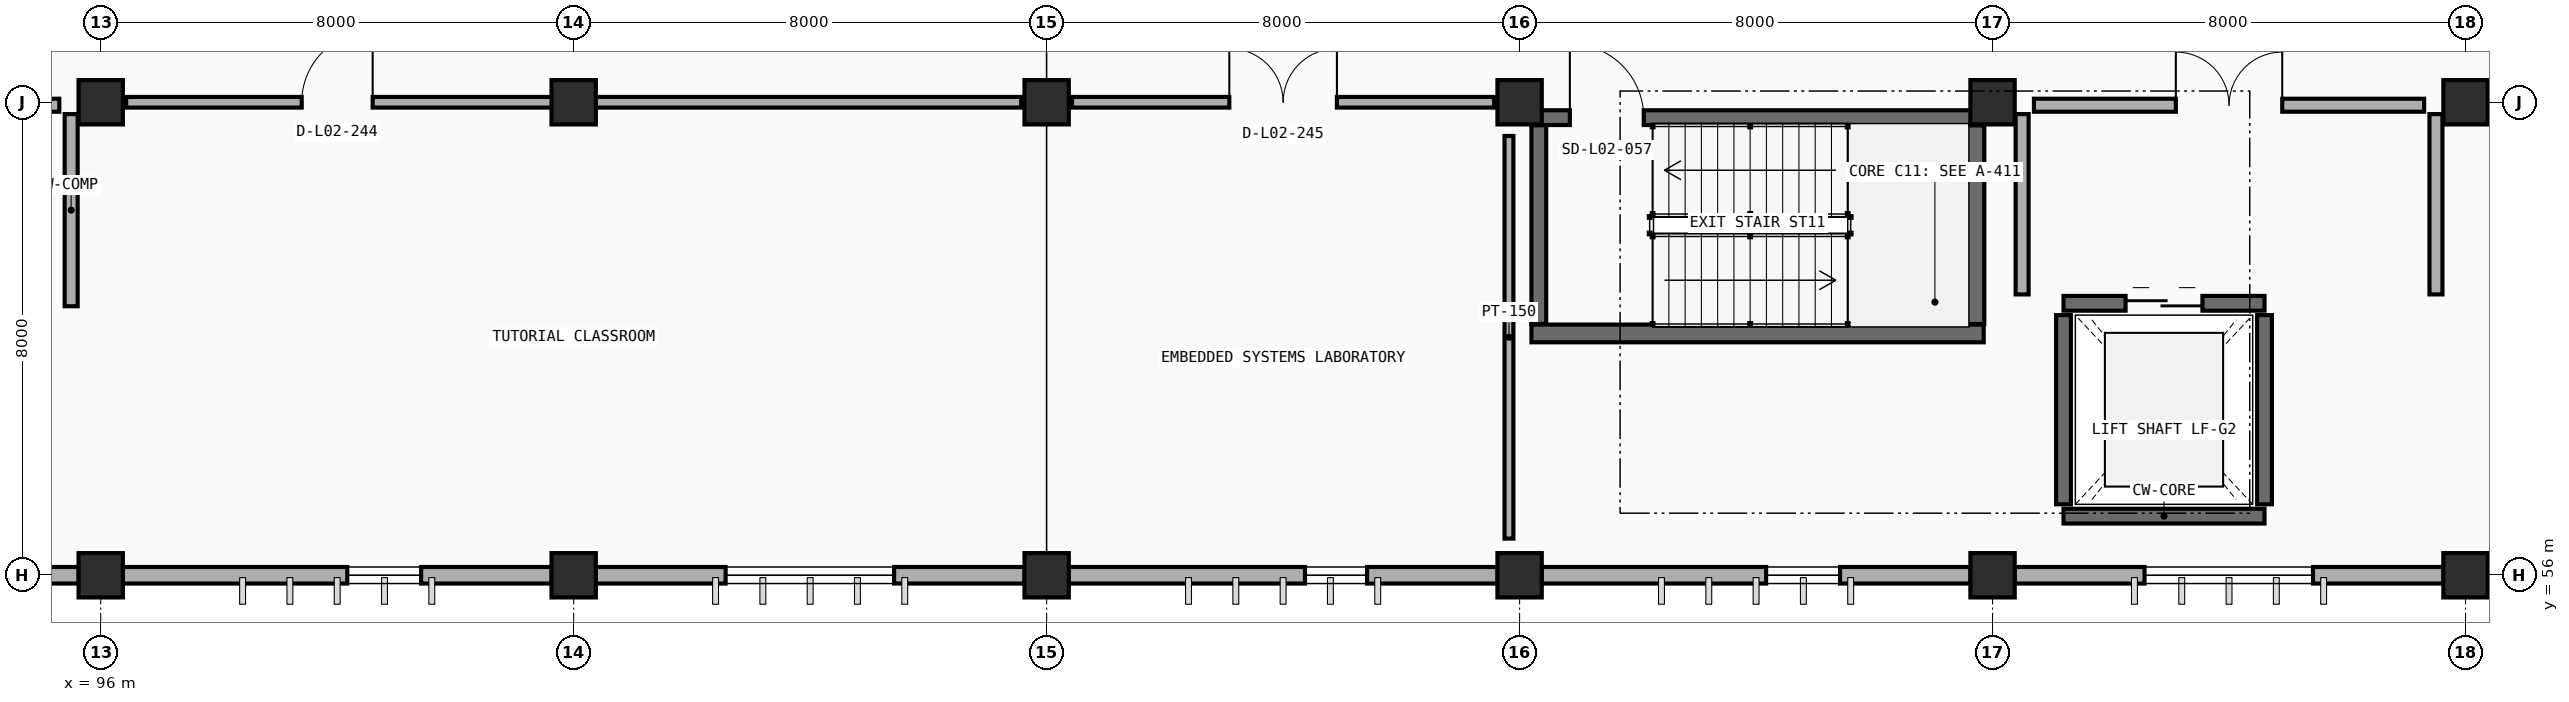
"""IFC4 building model, lengths in metres.
Left out: names, types, materials, properties, quantities, classifications, styles, units other than length and angle.
Written with IfcOpenShell. Run it as: python <this file> out.ifc"""

import sys

from ifc_helpers import new_model, si_unit, direction, frame, frame_2d, origin, origin_2d, place, context, subcontext, project, spatial, rectangle, extrude, element, fill, save


model = new_model("IFC4")
c1 = context("Model", 3, precision=1e-05, world=origin(), true_north=direction((0.0, 1.0)))
c2 = subcontext(c1, "Body", "Model", "MODEL_VIEW")
j1 = project(units=[si_unit("LENGTHUNIT", "METRE"), si_unit("PLANEANGLEUNIT", "RADIAN")], contexts=[c1])
p1 = place(None, origin())
s1 = spatial("IfcSite", under=j1, at=p1, CompositionType="ELEMENT")
p2 = place(p1, origin())
s2 = spatial("IfcBuilding", under=s1, at=p2, CompositionType="ELEMENT")
p3 = place(p2, frame((0.0, 0.0, 4.8)))
s3 = spatial("IfcBuildingStorey", under=s2, at=p3, CompositionType="ELEMENT", Elevation=4.8)
for number, where, z_axis, x_axis in (
    (1, (96.0, 56.0, 0.0), (0.0, 0.0, 1.0), (1.0, 0.0, 0.0)),
    (2, (104.0, 56.0, 0.0), (0.0, 0.0, 1.0), (1.0, 0.0, 0.0)),
    (3, (112.0, 56.0, 0.0), (0.0, 0.0, 1.0), (1.0, 0.0, 0.0)),
    (4, (120.0, 56.0, 0.0), (0.0, 0.0, 1.0), (1.0, 0.0, 0.0)),
    (5, (128.0, 56.0, 0.0), (0.0, 0.0, 1.0), (1.0, 0.0, 0.0)),
    (6, (136.0, 56.0, 0.0), (0.0, 0.0, 1.0), (1.0, 0.0, 0.0)),
    (7, (96.0, 64.0, 0.0), (0.0, 0.0, 1.0), (1.0, 0.0, 0.0)),
    (8, (104.0, 64.0, 0.0), (0.0, 0.0, 1.0), (1.0, 0.0, 0.0)),
    (9, (112.0, 64.0, 0.0), (0.0, 0.0, 1.0), (1.0, 0.0, 0.0)),
    (10, (120.0, 64.0, 0.0), (0.0, 0.0, 1.0), (1.0, 0.0, 0.0)),
    (11, (128.0, 64.0, 0.0), (0.0, 0.0, 1.0), (1.0, 0.0, 0.0)),
    (12, (136.0, 64.0, 0.0), (0.0, 0.0, 1.0), (1.0, 0.0, 0.0)),
):
    element("IfcColumn", number, at=place(p3, frame(where, z_axis=z_axis, x_axis=x_axis)), inside=s3, PredefinedType="COLUMN", context=c2, shape_type="SweptSolid", body=[
        extrude(rectangle(XDim=0.75, YDim=0.75, at=origin_2d()), origin(), (0.0, 0.0, 1.0), 4.8),
    ])
p4 = place(p3, frame((95.628, 56.0, 0.0), z_axis=(0.0, 0.0, 1.0), x_axis=(-1.0, 0.0, 0.0)))
e13 = element("IfcWall", 13, at=p4, inside=s3, PredefinedType="STANDARD", context=c2, shape_type="SweptSolid", body=[
    extrude(rectangle(XDim=7.256, YDim=0.28, at=frame_2d((3.628, 0.0))), origin(), (0.0, 0.0, 1.0), 3.91),
])
p5 = place(p4, frame((2.208, 0.0, 0.9)))
e14 = element("IfcOpeningElement", 14, at=p5, cuts=e13, PredefinedType="OPENING", context=c2, shape_type="SweptSolid", body=[
    extrude(rectangle(XDim=1.05, YDim=2.0, at=frame_2d((0.525, 1.0))), frame((0.0, 0.15, 0.0), z_axis=(0.0, -1.0, 0.0), x_axis=(1.0, 0.0, 0.0)), (0.0, 0.0, 1.0), 0.3),
])
p6 = place(p3, frame((103.628, 56.0, 0.0), z_axis=(0.0, 0.0, 1.0), x_axis=(-1.0, 0.0, 0.0)))
e15 = element("IfcWall", 15, at=p6, inside=s3, PredefinedType="STANDARD", context=c2, shape_type="SweptSolid", body=[
    extrude(rectangle(XDim=7.256, YDim=0.28, at=frame_2d((3.628, 0.0))), origin(), (0.0, 0.0, 1.0), 3.91),
])
p7 = place(p6, frame((2.208, 0.0, 0.9)))
e16 = element("IfcOpeningElement", 16, at=p7, cuts=e15, PredefinedType="OPENING", context=c2, shape_type="SweptSolid", body=[
    extrude(rectangle(XDim=1.25, YDim=2.0, at=frame_2d((0.625, 1.0))), frame((0.0, 0.15, 0.0), z_axis=(0.0, -1.0, 0.0), x_axis=(1.0, 0.0, 0.0)), (0.0, 0.0, 1.0), 0.3),
])
p8 = place(p3, frame((111.628, 56.0, 0.0), z_axis=(0.0, 0.0, 1.0), x_axis=(-1.0, 0.0, 0.0)))
e17 = element("IfcWall", 17, at=p8, inside=s3, PredefinedType="STANDARD", context=c2, shape_type="SweptSolid", body=[
    extrude(rectangle(XDim=7.256, YDim=0.28, at=frame_2d((3.628, 0.0))), origin(), (0.0, 0.0, 1.0), 3.91),
])
p9 = place(p8, frame((2.208, 0.0, 0.9)))
e18 = element("IfcOpeningElement", 18, at=p9, cuts=e17, PredefinedType="OPENING", context=c2, shape_type="SweptSolid", body=[
    extrude(rectangle(XDim=2.85, YDim=1.85, at=frame_2d((1.425, 0.925))), frame((0.0, 0.15, 0.0), z_axis=(0.0, -1.0, 0.0), x_axis=(1.0, 0.0, 0.0)), (0.0, 0.0, 1.0), 0.3),
])
p10 = place(p3, frame((119.628, 56.0, 0.0), z_axis=(0.0, 0.0, 1.0), x_axis=(-1.0, 0.0, 0.0)))
e19 = element("IfcWall", 19, at=p10, inside=s3, PredefinedType="STANDARD", context=c2, shape_type="SweptSolid", body=[
    extrude(rectangle(XDim=7.256, YDim=0.28, at=frame_2d((3.628, 0.0))), origin(), (0.0, 0.0, 1.0), 3.91),
])
p11 = place(p10, frame((2.208, 0.0, 0.9)))
e20 = element("IfcOpeningElement", 20, at=p11, cuts=e19, PredefinedType="OPENING", context=c2, shape_type="SweptSolid", body=[
    extrude(rectangle(XDim=1.05, YDim=2.0, at=frame_2d((0.525, 1.0))), frame((0.0, 0.15, 0.0), z_axis=(0.0, -1.0, 0.0), x_axis=(1.0, 0.0, 0.0)), (0.0, 0.0, 1.0), 0.3),
])
p12 = place(p3, frame((127.628, 56.0, 0.0), z_axis=(0.0, 0.0, 1.0), x_axis=(-1.0, 0.0, 0.0)))
e21 = element("IfcWall", 21, at=p12, inside=s3, PredefinedType="STANDARD", context=c2, shape_type="SweptSolid", body=[
    extrude(rectangle(XDim=7.256, YDim=0.28, at=frame_2d((3.628, 0.0))), origin(), (0.0, 0.0, 1.0), 3.91),
])
p13 = place(p12, frame((2.208, 0.0, 0.9)))
e22 = element("IfcOpeningElement", 22, at=p13, cuts=e21, PredefinedType="OPENING", context=c2, shape_type="SweptSolid", body=[
    extrude(rectangle(XDim=1.25, YDim=2.0, at=frame_2d((0.625, 1.0))), frame((0.0, 0.15, 0.0), z_axis=(0.0, -1.0, 0.0), x_axis=(1.0, 0.0, 0.0)), (0.0, 0.0, 1.0), 0.3),
])
p14 = place(p3, frame((135.628, 56.0, 0.0), z_axis=(0.0, 0.0, 1.0), x_axis=(-1.0, 0.0, 0.0)))
e23 = element("IfcWall", 23, at=p14, inside=s3, PredefinedType="STANDARD", context=c2, shape_type="SweptSolid", body=[
    extrude(rectangle(XDim=7.256, YDim=0.28, at=frame_2d((3.628, 0.0))), origin(), (0.0, 0.0, 1.0), 3.91),
])
p15 = place(p14, frame((2.208, 0.0, 0.9)))
e24 = element("IfcOpeningElement", 24, at=p15, cuts=e23, PredefinedType="OPENING", context=c2, shape_type="SweptSolid", body=[
    extrude(rectangle(XDim=2.85, YDim=1.85, at=frame_2d((1.425, 0.925))), frame((0.0, 0.15, 0.0), z_axis=(0.0, -1.0, 0.0), x_axis=(1.0, 0.0, 0.0)), (0.0, 0.0, 1.0), 0.3),
])
p16 = place(p3, frame((143.628, 56.0, 0.0), z_axis=(0.0, 0.0, 1.0), x_axis=(-1.0, 0.0, 0.0)))
e25 = element("IfcWall", 25, at=p16, inside=s3, PredefinedType="STANDARD", context=c2, shape_type="SweptSolid", body=[
    extrude(rectangle(XDim=7.256, YDim=0.28, at=frame_2d((3.628, 0.0))), origin(), (0.0, 0.0, 1.0), 3.91),
])
p17 = place(p16, frame((2.208, 0.0, 0.9)))
e26 = element("IfcOpeningElement", 26, at=p17, cuts=e25, PredefinedType="OPENING", context=c2, shape_type="SweptSolid", body=[
    extrude(rectangle(XDim=1.05, YDim=2.0, at=frame_2d((0.525, 1.0))), frame((0.0, 0.15, 0.0), z_axis=(0.0, -1.0, 0.0), x_axis=(1.0, 0.0, 0.0)), (0.0, 0.0, 1.0), 0.3),
])
p18 = place(p3, frame((120.2, 60.09, 0.0), z_axis=(0.0, 0.0, 1.0), x_axis=(1.0, 0.0, 0.0)))
e27 = element("IfcWall", 27, at=p18, inside=s3, PredefinedType="SHEAR", context=c2, shape_type="SweptSolid", body=[
    extrude(rectangle(XDim=7.65, YDim=0.3, at=frame_2d((3.825, 0.0))), origin(), (0.0, 0.0, 1.0), 4.8),
])
p19 = place(p3, frame((127.71, 60.25, 0.0), z_axis=(0.0, 0.0, 1.0), x_axis=(0.0, 1.0, 0.0)))
e28 = element("IfcWall", 28, at=p19, inside=s3, PredefinedType="SHEAR", context=c2, shape_type="SweptSolid", body=[
    extrude(rectangle(XDim=3.36, YDim=0.3, at=frame_2d((1.68, 0.0))), origin(), (0.0, 0.0, 1.0), 4.8),
])
p20 = place(p3, frame((120.2, 63.74, 0.0), z_axis=(0.0, 0.0, 1.0), x_axis=(1.0, 0.0, 0.0)))
e29 = element("IfcWall", 29, at=p20, inside=s3, PredefinedType="SOLIDWALL", context=c2, shape_type="SweptSolid", body=[
    extrude(rectangle(XDim=7.65, YDim=0.25, at=frame_2d((3.825, 0.0))), origin(), (0.0, 0.0, 1.0), 4.8),
])
p21 = place(p20, frame((0.65, 0.0, 0.0)))
e30 = element("IfcOpeningElement", 30, at=p21, cuts=e29, PredefinedType="OPENING", context=c2, shape_type="SweptSolid", body=[
    extrude(rectangle(XDim=1.25, YDim=2.15, at=frame_2d((0.625, 1.075))), frame((0.0, 0.135, 0.0), z_axis=(0.0, -1.0, 0.0), x_axis=(1.0, 0.0, 0.0)), (0.0, 0.0, 1.0), 0.27),
])
p22 = place(p3, frame((120.325, 60.25, 0.0), z_axis=(0.0, 0.0, 1.0), x_axis=(0.0, 1.0, 0.0)))
e31 = element("IfcWall", 31, at=p22, inside=s3, PredefinedType="SOLIDWALL", context=c2, shape_type="SweptSolid", body=[
    extrude(rectangle(XDim=3.36, YDim=0.25, at=frame_2d((1.68, 0.0))), origin(), (0.0, 0.0, 1.0), 4.8),
])
p23 = place(p3, frame((88.7, 63.95, 0.0), z_axis=(0.0, 0.0, 1.0), x_axis=(1.0, 0.0, 0.0)))
e32 = element("IfcWall", 32, at=p23, inside=s3, PredefinedType="PARTITIONING", context=c2, shape_type="SweptSolid", body=[
    extrude(rectangle(XDim=6.6, YDim=0.22, at=frame_2d((3.3, 0.0))), origin(), (0.0, 0.0, 1.0), 3.86),
])
p24 = place(p23, frame((2.4, 0.0, 0.0)))
e33 = element("IfcOpeningElement", 33, at=p24, cuts=e32, PredefinedType="OPENING", context=c2, shape_type="SweptSolid", body=[
    extrude(rectangle(XDim=1.8, YDim=2.2, at=frame_2d((0.9, 1.1))), frame((0.0, 0.12, 0.0), z_axis=(0.0, -1.0, 0.0), x_axis=(1.0, 0.0, 0.0)), (0.0, 0.0, 1.0), 0.24),
])
p25 = place(p3, frame((95.5, 60.55, 0.0), z_axis=(0.0, 0.0, 1.0), x_axis=(0.0, 1.0, 0.0)))
e34 = element("IfcWall", 34, at=p25, inside=s3, PredefinedType="PARTITIONING", context=c2, shape_type="SweptSolid", body=[
    extrude(rectangle(XDim=3.25, YDim=0.22, at=frame_2d((1.625, 0.0))), origin(), (0.0, 0.0, 1.0), 3.76),
])
p26 = place(p3, frame((129.2, 57.0, 0.0), z_axis=(0.0, 0.0, 1.0), x_axis=(1.0, 0.0, 0.0)))
e35 = element("IfcWall", 35, at=p26, inside=s3, PredefinedType="SOLIDWALL", context=c2, shape_type="SweptSolid", body=[
    extrude(rectangle(XDim=3.4, YDim=0.25, at=frame_2d((1.7, 0.0))), origin(), (0.0, 0.0, 1.0), 4.8),
])
p27 = place(p3, frame((129.2, 60.6, 0.0), z_axis=(0.0, 0.0, 1.0), x_axis=(1.0, 0.0, 0.0)))
e36 = element("IfcWall", 36, at=p27, inside=s3, PredefinedType="SOLIDWALL", context=c2, shape_type="SweptSolid", body=[
    extrude(rectangle(XDim=3.4, YDim=0.25, at=frame_2d((1.7, 0.0))), origin(), (0.0, 0.0, 1.0), 4.8),
])
p28 = place(p27, frame((1.05, 0.0, 0.0)))
e37 = element("IfcOpeningElement", 37, at=p28, cuts=e36, PredefinedType="OPENING", context=c2, shape_type="SweptSolid", body=[
    extrude(rectangle(XDim=1.3, YDim=2.2, at=frame_2d((0.65, 1.1))), frame((0.0, 0.135, 0.0), z_axis=(0.0, -1.0, 0.0), x_axis=(1.0, 0.0, 0.0)), (0.0, 0.0, 1.0), 0.27),
])
for number, where, z_axis, x_axis in (
    (38, (129.2, 57.2, 0.0), (0.0, 0.0, 1.0), (0.0, 1.0, 0.0)),
    (39, (132.6, 57.2, 0.0), (0.0, 0.0, 1.0), (0.0, 1.0, 0.0)),
):
    element("IfcWall", number, at=place(p3, frame(where, z_axis=z_axis, x_axis=x_axis)), inside=s3, PredefinedType="SOLIDWALL", context=c2, shape_type="SweptSolid", body=[
        extrude(rectangle(XDim=3.2, YDim=0.25, at=frame_2d((1.6, 0.0))), origin(), (0.0, 0.0, 1.0), 4.8),
    ])
p29 = place(p3, frame((128.7, 63.95, 0.0), z_axis=(0.0, 0.0, 1.0), x_axis=(1.0, 0.0, 0.0)))
e40 = element("IfcWall", 40, at=p29, inside=s3, PredefinedType="PARTITIONING", context=c2, shape_type="SweptSolid", body=[
    extrude(rectangle(XDim=6.6, YDim=0.22, at=frame_2d((3.3, 0.0))), origin(), (0.0, 0.0, 1.0), 3.86),
])
p30 = place(p29, frame((2.4, 0.0, 0.0)))
e41 = element("IfcOpeningElement", 41, at=p30, cuts=e40, PredefinedType="OPENING", context=c2, shape_type="SweptSolid", body=[
    extrude(rectangle(XDim=1.8, YDim=2.2, at=frame_2d((0.9, 1.1))), frame((0.0, 0.12, 0.0), z_axis=(0.0, -1.0, 0.0), x_axis=(1.0, 0.0, 0.0)), (0.0, 0.0, 1.0), 0.24),
])
for number, where, z_axis, x_axis in (
    (42, (128.5, 60.75, 0.0), (0.0, 0.0, 1.0), (0.0, 1.0, 0.0)),
    (43, (135.5, 60.75, 0.0), (0.0, 0.0, 1.0), (0.0, 1.0, 0.0)),
):
    element("IfcWall", number, at=place(p3, frame(where, z_axis=z_axis, x_axis=x_axis)), inside=s3, PredefinedType="PARTITIONING", context=c2, shape_type="SweptSolid", body=[
        extrude(rectangle(XDim=3.05, YDim=0.22, at=frame_2d((1.525, 0.0))), origin(), (0.0, 0.0, 1.0), 3.76),
    ])
p31 = place(p3, frame((96.43, 64.0, 0.0), z_axis=(0.0, 0.0, 1.0), x_axis=(1.0, 0.0, 0.0)))
e44 = element("IfcWall", 44, at=p31, inside=s3, PredefinedType="PARTITIONING", context=c2, shape_type="SweptSolid", body=[
    extrude(rectangle(XDim=15.14, YDim=0.18, at=frame_2d((7.57, 0.0))), origin(), (0.0, 0.0, 1.0), 3.86),
])
p32 = place(p31, frame((2.97, 0.0, 0.0)))
e45 = element("IfcOpeningElement", 45, at=p32, cuts=e44, PredefinedType="OPENING", context=c2, shape_type="SweptSolid", body=[
    extrude(rectangle(XDim=1.2, YDim=2.2, at=frame_2d((0.6, 1.1))), frame((0.0, 0.1, 0.0), z_axis=(0.0, -1.0, 0.0), x_axis=(1.0, 0.0, 0.0)), (0.0, 0.0, 1.0), 0.2),
])
p33 = place(p3, frame((112.43, 64.0, 0.0), z_axis=(0.0, 0.0, 1.0), x_axis=(1.0, 0.0, 0.0)))
e46 = element("IfcWall", 46, at=p33, inside=s3, PredefinedType="PARTITIONING", context=c2, shape_type="SweptSolid", body=[
    extrude(rectangle(XDim=7.14, YDim=0.18, at=frame_2d((3.57, 0.0))), origin(), (0.0, 0.0, 1.0), 3.86),
])
p34 = place(p33, frame((2.66, 0.0, 0.0)))
e47 = element("IfcOpeningElement", 47, at=p34, cuts=e46, PredefinedType="OPENING", context=c2, shape_type="SweptSolid", body=[
    extrude(rectangle(XDim=1.82, YDim=2.25, at=frame_2d((0.91, 1.125))), frame((0.0, 0.1, 0.0), z_axis=(0.0, -1.0, 0.0), x_axis=(1.0, 0.0, 0.0)), (0.0, 0.0, 1.0), 0.2),
])
p35 = place(p3, frame((119.82, 56.62, 0.0), z_axis=(0.0, 0.0, 1.0), x_axis=(0.0, 1.0, 0.0)))
e48 = element("IfcWall", 48, at=p35, inside=s3, PredefinedType="PARTITIONING", context=c2, shape_type="SweptSolid", body=[
    extrude(rectangle(XDim=6.81, YDim=0.15, at=frame_2d((3.405, 0.0))), origin(), (0.0, 0.0, 1.0), 3.76),
])
p36 = place(p7, origin())
e49 = element("IfcWindow", 49, at=p36, inside=s3, PartitioningType="SINGLE_PANEL", PredefinedType="WINDOW", context=c2, shape_type="SweptSolid", body=[
    extrude(rectangle(XDim=1.25, YDim=2.0, at=frame_2d((0.625, 1.0))), frame((0.0, 0.03, 0.0), z_axis=(0.0, -1.0, 0.0), x_axis=(1.0, 0.0, 0.0)), (0.0, 0.0, 1.0), 0.06),
])
fill(e16, e49)
p37 = place(p9, origin())
e50 = element("IfcWindow", 50, at=p37, inside=s3, PartitioningType="DOUBLE_PANEL_VERTICAL", PredefinedType="WINDOW", context=c2, shape_type="SweptSolid", body=[
    extrude(rectangle(XDim=2.85, YDim=1.85, at=frame_2d((1.425, 0.925))), frame((0.0, 0.03, 0.0), z_axis=(0.0, -1.0, 0.0), x_axis=(1.0, 0.0, 0.0)), (0.0, 0.0, 1.0), 0.06),
])
fill(e18, e50)
p38 = place(p11, origin())
e51 = element("IfcWindow", 51, at=p38, inside=s3, PartitioningType="SINGLE_PANEL", PredefinedType="WINDOW", context=c2, shape_type="SweptSolid", body=[
    extrude(rectangle(XDim=1.05, YDim=2.0, at=frame_2d((0.525, 1.0))), frame((0.0, 0.03, 0.0), z_axis=(0.0, -1.0, 0.0), x_axis=(1.0, 0.0, 0.0)), (0.0, 0.0, 1.0), 0.06),
])
fill(e20, e51)
p39 = place(p13, origin())
e52 = element("IfcWindow", 52, at=p39, inside=s3, PartitioningType="SINGLE_PANEL", PredefinedType="WINDOW", context=c2, shape_type="SweptSolid", body=[
    extrude(rectangle(XDim=1.25, YDim=2.0, at=frame_2d((0.625, 1.0))), frame((0.0, 0.03, 0.0), z_axis=(0.0, -1.0, 0.0), x_axis=(1.0, 0.0, 0.0)), (0.0, 0.0, 1.0), 0.06),
])
fill(e22, e52)
p40 = place(p15, origin())
e53 = element("IfcWindow", 53, at=p40, inside=s3, PartitioningType="DOUBLE_PANEL_VERTICAL", PredefinedType="WINDOW", context=c2, shape_type="SweptSolid", body=[
    extrude(rectangle(XDim=2.85, YDim=1.85, at=frame_2d((1.425, 0.925))), frame((0.0, 0.03, 0.0), z_axis=(0.0, -1.0, 0.0), x_axis=(1.0, 0.0, 0.0)), (0.0, 0.0, 1.0), 0.06),
])
fill(e24, e53)
p41 = place(p21, origin())
e54 = element("IfcDoor", 54, at=p41, inside=s3, OperationType="SINGLE_SWING_LEFT", PredefinedType="DOOR", context=c2, shape_type="SweptSolid", body=[
    extrude(rectangle(XDim=1.25, YDim=2.15, at=frame_2d((0.625, 1.075))), frame((0.0, 0.025, 0.0), z_axis=(0.0, -1.0, 0.0), x_axis=(1.0, 0.0, 0.0)), (0.0, 0.0, 1.0), 0.05),
])
fill(e30, e54)
p42 = place(p28, origin())
e55 = element("IfcDoor", 55, at=p42, inside=s3, OperationType="DOUBLE_DOOR_SLIDING", PredefinedType="DOOR", context=c2, shape_type="SweptSolid", body=[
    extrude(rectangle(XDim=1.3, YDim=2.2, at=frame_2d((0.65, 1.1))), frame((0.0, 0.025, 0.0), z_axis=(0.0, -1.0, 0.0), x_axis=(1.0, 0.0, 0.0)), (0.0, 0.0, 1.0), 0.05),
])
fill(e37, e55)
p43 = place(p30, origin())
e56 = element("IfcDoor", 56, at=p43, inside=s3, OperationType="DOUBLE_DOOR_SINGLE_SWING", PredefinedType="DOOR", context=c2, shape_type="SweptSolid", body=[
    extrude(rectangle(XDim=1.8, YDim=2.2, at=frame_2d((0.9, 1.1))), frame((0.0, 0.025, 0.0), z_axis=(0.0, -1.0, 0.0), x_axis=(1.0, 0.0, 0.0)), (0.0, 0.0, 1.0), 0.05),
])
fill(e41, e56)
p44 = place(p32, origin())
e57 = element("IfcDoor", 57, at=p44, inside=s3, OperationType="SINGLE_SWING_RIGHT", PredefinedType="DOOR", context=c2, shape_type="SweptSolid", body=[
    extrude(rectangle(XDim=1.2, YDim=2.2, at=frame_2d((0.6, 1.1))), frame((0.0, 0.025, 0.0), z_axis=(0.0, -1.0, 0.0), x_axis=(1.0, 0.0, 0.0)), (0.0, 0.0, 1.0), 0.05),
])
fill(e45, e57)
p45 = place(p34, origin())
e58 = element("IfcDoor", 58, at=p45, inside=s3, OperationType="DOUBLE_DOOR_SINGLE_SWING", PredefinedType="DOOR", context=c2, shape_type="SweptSolid", body=[
    extrude(rectangle(XDim=1.82, YDim=2.25, at=frame_2d((0.91, 1.125))), frame((0.0, 0.025, 0.0), z_axis=(0.0, -1.0, 0.0), x_axis=(1.0, 0.0, 0.0)), (0.0, 0.0, 1.0), 0.05),
])
fill(e47, e58)
save(model, sys.argv[1])
